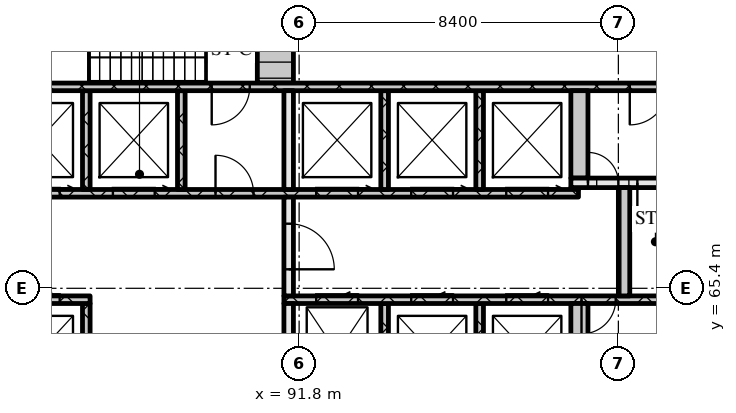
"""IFC4 building model, lengths in metres.
Left out: names, types, materials, properties, quantities, classifications, styles, units other than length and angle.
Written with IfcOpenShell. Run it as: python <this file> out.ifc"""

import sys

from ifc_helpers import new_model, si_unit, direction, frame, frame_2d, origin, place, context, subcontext, project, spatial, rectangle, extrude, element, fill, save


model = new_model("IFC4")
c1 = context("Model", 3, precision=1e-05, world=origin(), true_north=direction((0.0, 1.0)))
c2 = subcontext(c1, "Body", "Model", "MODEL_VIEW")
j1 = project(units=[si_unit("LENGTHUNIT", "METRE"), si_unit("PLANEANGLEUNIT", "RADIAN")], contexts=[c1])
p1 = place(None, origin())
s1 = spatial("IfcSite", under=j1, at=p1, CompositionType="ELEMENT")
p2 = place(p1, origin())
s2 = spatial("IfcBuilding", under=s1, at=p2, CompositionType="ELEMENT")
p3 = place(p2, origin())
s3 = spatial("IfcBuildingStorey", under=s2, at=p3, CompositionType="ELEMENT", Elevation=0.0)
p4 = place(p3, frame((86.2, 62.4, 0.0), z_axis=(0.0, 0.0, 1.0), x_axis=(0.0, 1.0, 0.0)))
e1 = element("IfcWall", 1, at=p4, inside=s3, PredefinedType="SOLIDWALL", context=c2, shape_type="SweptSolid", body=[
    extrude(rectangle(XDim=2.6, YDim=0.2, at=frame_2d((1.3, 0.0))), origin(), (0.0, 0.0, 1.0), 8.7),
])
p5 = place(p3, frame((91.525, 62.4, 0.0), z_axis=(0.0, 0.0, 1.0), x_axis=(0.0, 1.0, 0.0)))
e2 = element("IfcWall", 2, at=p5, inside=s3, PredefinedType="SOLIDWALL", context=c2, shape_type="SweptSolid", body=[
    extrude(rectangle(XDim=2.6, YDim=0.25, at=frame_2d((1.3, 0.0))), origin(), (0.0, 0.0, 1.0), 8.7),
])
for number, where, z_axis, x_axis in (
    (3, (94.05, 62.4, 0.0), (0.0, 0.0, 1.0), (0.0, 1.0, 0.0)),
    (4, (96.55, 62.4, 0.0), (0.0, 0.0, 1.0), (0.0, 1.0, 0.0)),
):
    element("IfcWall", number, at=place(p3, frame(where, z_axis=z_axis, x_axis=x_axis)), inside=s3, PredefinedType="SOLIDWALL", context=c2, shape_type="SweptSolid", body=[
        extrude(rectangle(XDim=2.6, YDim=0.2, at=frame_2d((1.3, 0.0))), origin(), (0.0, 0.0, 1.0), 8.7),
    ])
p6 = place(p3, frame((99.175, 62.4, 0.0), z_axis=(0.0, 0.0, 1.0), x_axis=(0.0, 1.0, 0.0)))
e5 = element("IfcWall", 5, at=p6, inside=s3, PredefinedType="SOLIDWALL", context=c2, shape_type="SweptSolid", body=[
    extrude(rectangle(XDim=2.6, YDim=0.45, at=frame_2d((1.3, 0.0))), origin(), (0.0, 0.0, 1.0), 8.7),
])
p7 = place(p3, frame((67.8, 65.1, 0.0), z_axis=(0.0, 0.0, 1.0), x_axis=(1.0, 0.0, 0.0)))
e6 = element("IfcWall", 6, at=p7, inside=s3, PredefinedType="SOLIDWALL", context=c2, shape_type="SweptSolid", body=[
    extrude(rectangle(XDim=18.5, YDim=0.2, at=frame_2d((9.25, 0.0))), origin(), (0.0, 0.0, 1.0), 8.7),
])
p8 = place(p7, frame((7.27, 0.0, 0.0)))
e7 = element("IfcOpeningElement", 7, at=p8, cuts=e6, PredefinedType="OPENING", context=c2, shape_type="SweptSolid", body=[
    extrude(rectangle(XDim=0.9, YDim=2.1, at=frame_2d((0.45, 1.05))), frame((0.0, 0.11, 0.0), z_axis=(0.0, -1.0, 0.0), x_axis=(1.0, 0.0, 0.0)), (0.0, 0.0, 1.0), 0.22),
])
p9 = place(p7, frame((8.85, 0.0, 0.0)))
e8 = element("IfcOpeningElement", 8, at=p9, cuts=e6, PredefinedType="OPENING", context=c2, shape_type="SweptSolid", body=[
    extrude(rectangle(XDim=1.1, YDim=2.1, at=frame_2d((0.55, 1.05))), frame((0.0, 0.11, 0.0), z_axis=(0.0, -1.0, 0.0), x_axis=(1.0, 0.0, 0.0)), (0.0, 0.0, 1.0), 0.22),
])
p10 = place(p7, frame((11.35, 0.0, 0.0)))
e9 = element("IfcOpeningElement", 9, at=p10, cuts=e6, PredefinedType="OPENING", context=c2, shape_type="SweptSolid", body=[
    extrude(rectangle(XDim=1.1, YDim=2.1, at=frame_2d((0.55, 1.05))), frame((0.0, 0.11, 0.0), z_axis=(0.0, -1.0, 0.0), x_axis=(1.0, 0.0, 0.0)), (0.0, 0.0, 1.0), 0.22),
])
p11 = place(p7, frame((13.85, 0.0, 0.0)))
e10 = element("IfcOpeningElement", 10, at=p11, cuts=e6, PredefinedType="OPENING", context=c2, shape_type="SweptSolid", body=[
    extrude(rectangle(XDim=1.1, YDim=2.1, at=frame_2d((0.55, 1.05))), frame((0.0, 0.11, 0.0), z_axis=(0.0, -1.0, 0.0), x_axis=(1.0, 0.0, 0.0)), (0.0, 0.0, 1.0), 0.22),
])
p12 = place(p7, frame((16.6, 0.0, 0.0)))
e11 = element("IfcOpeningElement", 11, at=p12, cuts=e6, PredefinedType="OPENING", context=c2, shape_type="SweptSolid", body=[
    extrude(rectangle(XDim=1.1, YDim=2.1, at=frame_2d((0.55, 1.05))), frame((0.0, 0.11, 0.0), z_axis=(0.0, -1.0, 0.0), x_axis=(1.0, 0.0, 0.0)), (0.0, 0.0, 1.0), 0.22),
])
p13 = place(p3, frame((91.4, 65.1, 0.0), z_axis=(0.0, 0.0, 1.0), x_axis=(1.0, 0.0, 0.0)))
e12 = element("IfcWall", 12, at=p13, inside=s3, PredefinedType="SOLIDWALL", context=c2, shape_type="SweptSolid", body=[
    extrude(rectangle(XDim=16.0, YDim=0.2, at=frame_2d((8.0, 0.0))), origin(), (0.0, 0.0, 1.0), 8.7),
])
p14 = place(p13, frame((0.85, 0.0, 0.0)))
e13 = element("IfcOpeningElement", 13, at=p14, cuts=e12, PredefinedType="OPENING", context=c2, shape_type="SweptSolid", body=[
    extrude(rectangle(XDim=1.1, YDim=2.1, at=frame_2d((0.55, 1.05))), frame((0.0, 0.11, 0.0), z_axis=(0.0, -1.0, 0.0), x_axis=(1.0, 0.0, 0.0)), (0.0, 0.0, 1.0), 0.22),
])
p15 = place(p13, frame((3.35, 0.0, 0.0)))
e14 = element("IfcOpeningElement", 14, at=p15, cuts=e12, PredefinedType="OPENING", context=c2, shape_type="SweptSolid", body=[
    extrude(rectangle(XDim=1.1, YDim=2.1, at=frame_2d((0.55, 1.05))), frame((0.0, 0.11, 0.0), z_axis=(0.0, -1.0, 0.0), x_axis=(1.0, 0.0, 0.0)), (0.0, 0.0, 1.0), 0.22),
])
p16 = place(p13, frame((5.85, 0.0, 0.0)))
e15 = element("IfcOpeningElement", 15, at=p16, cuts=e12, PredefinedType="OPENING", context=c2, shape_type="SweptSolid", body=[
    extrude(rectangle(XDim=1.1, YDim=2.1, at=frame_2d((0.55, 1.05))), frame((0.0, 0.11, 0.0), z_axis=(0.0, -1.0, 0.0), x_axis=(1.0, 0.0, 0.0)), (0.0, 0.0, 1.0), 0.22),
])
p17 = place(p13, frame((7.83, 0.0, 0.0)))
e16 = element("IfcOpeningElement", 16, at=p17, cuts=e12, PredefinedType="OPENING", context=c2, shape_type="SweptSolid", body=[
    extrude(rectangle(XDim=0.9, YDim=2.1, at=frame_2d((0.45, 1.05))), frame((0.0, 0.11, 0.0), z_axis=(0.0, -1.0, 0.0), x_axis=(1.0, 0.0, 0.0)), (0.0, 0.0, 1.0), 0.22),
])
p18 = place(p3, frame((91.525, 65.2, 0.0), z_axis=(0.0, 0.0, 1.0), x_axis=(0.0, 1.0, 0.0)))
e17 = element("IfcWall", 17, at=p18, inside=s3, PredefinedType="SOLIDWALL", context=c2, shape_type="SweptSolid", body=[
    extrude(rectangle(XDim=2.6, YDim=0.25, at=frame_2d((1.3, 0.0))), origin(), (0.0, 0.0, 1.0), 8.7),
])
p19 = place(p18, frame((0.7, 0.0, 0.0)))
e18 = element("IfcOpeningElement", 18, at=p19, cuts=e17, PredefinedType="OPENING", context=c2, shape_type="SweptSolid", body=[
    extrude(rectangle(XDim=1.2, YDim=2.1, at=frame_2d((0.6, 1.05))), frame((0.0, 0.135, 0.0), z_axis=(0.0, -1.0, 0.0), x_axis=(1.0, 0.0, 0.0)), (0.0, 0.0, 1.0), 0.27),
])
p20 = place(p3, frame((100.35, 65.2, 0.0), z_axis=(0.0, 0.0, 1.0), x_axis=(0.0, 1.0, 0.0)))
e19 = element("IfcWall", 19, at=p20, inside=s3, PredefinedType="SOLIDWALL", context=c2, shape_type="SweptSolid", body=[
    extrude(rectangle(XDim=2.85, YDim=0.3, at=frame_2d((1.425, 0.0))), origin(), (0.0, 0.0, 1.0), 8.7),
])
p21 = place(p3, frame((76.05, 67.9, 0.0), z_axis=(0.0, 0.0, 1.0), x_axis=(1.0, 0.0, 0.0)))
e20 = element("IfcWall", 20, at=p21, inside=s3, PredefinedType="SOLIDWALL", context=c2, shape_type="SweptSolid", body=[
    extrude(rectangle(XDim=23.1, YDim=0.2, at=frame_2d((11.55, 0.0))), origin(), (0.0, 0.0, 1.0), 8.7),
])
p22 = place(p21, frame((0.6, 0.0, 0.0)))
e21 = element("IfcOpeningElement", 21, at=p22, cuts=e20, PredefinedType="OPENING", context=c2, shape_type="SweptSolid", body=[
    extrude(rectangle(XDim=1.1, YDim=2.1, at=frame_2d((0.55, 1.05))), frame((0.0, 0.11, 0.0), z_axis=(0.0, -1.0, 0.0), x_axis=(1.0, 0.0, 0.0)), (0.0, 0.0, 1.0), 0.22),
])
p23 = place(p21, frame((3.1, 0.0, 0.0)))
e22 = element("IfcOpeningElement", 22, at=p23, cuts=e20, PredefinedType="OPENING", context=c2, shape_type="SweptSolid", body=[
    extrude(rectangle(XDim=1.1, YDim=2.1, at=frame_2d((0.55, 1.05))), frame((0.0, 0.11, 0.0), z_axis=(0.0, -1.0, 0.0), x_axis=(1.0, 0.0, 0.0)), (0.0, 0.0, 1.0), 0.22),
])
p24 = place(p21, frame((5.6, 0.0, 0.0)))
e23 = element("IfcOpeningElement", 23, at=p24, cuts=e20, PredefinedType="OPENING", context=c2, shape_type="SweptSolid", body=[
    extrude(rectangle(XDim=1.1, YDim=2.1, at=frame_2d((0.55, 1.05))), frame((0.0, 0.11, 0.0), z_axis=(0.0, -1.0, 0.0), x_axis=(1.0, 0.0, 0.0)), (0.0, 0.0, 1.0), 0.22),
])
p25 = place(p21, frame((8.35, 0.0, 0.0)))
e24 = element("IfcOpeningElement", 24, at=p25, cuts=e20, PredefinedType="OPENING", context=c2, shape_type="SweptSolid", body=[
    extrude(rectangle(XDim=1.1, YDim=2.1, at=frame_2d((0.55, 1.05))), frame((0.0, 0.11, 0.0), z_axis=(0.0, -1.0, 0.0), x_axis=(1.0, 0.0, 0.0)), (0.0, 0.0, 1.0), 0.22),
])
p26 = place(p21, frame((10.85, 0.0, 0.0)))
e25 = element("IfcOpeningElement", 25, at=p26, cuts=e20, PredefinedType="OPENING", context=c2, shape_type="SweptSolid", body=[
    extrude(rectangle(XDim=1.1, YDim=2.1, at=frame_2d((0.55, 1.05))), frame((0.0, 0.11, 0.0), z_axis=(0.0, -1.0, 0.0), x_axis=(1.0, 0.0, 0.0)), (0.0, 0.0, 1.0), 0.22),
])
p27 = place(p21, frame((13.55, 0.0, 0.0)))
e26 = element("IfcOpeningElement", 26, at=p27, cuts=e20, PredefinedType="OPENING", context=c2, shape_type="SweptSolid", body=[
    extrude(rectangle(XDim=1.0, YDim=2.1, at=frame_2d((0.5, 1.05))), frame((0.0, 0.11, 0.0), z_axis=(0.0, -1.0, 0.0), x_axis=(1.0, 0.0, 0.0)), (0.0, 0.0, 1.0), 0.22),
])
p28 = place(p21, frame((16.2, 0.0, 0.0)))
e27 = element("IfcOpeningElement", 27, at=p28, cuts=e20, PredefinedType="OPENING", context=c2, shape_type="SweptSolid", body=[
    extrude(rectangle(XDim=1.1, YDim=2.1, at=frame_2d((0.55, 1.05))), frame((0.0, 0.11, 0.0), z_axis=(0.0, -1.0, 0.0), x_axis=(1.0, 0.0, 0.0)), (0.0, 0.0, 1.0), 0.22),
])
p29 = place(p21, frame((18.7, 0.0, 0.0)))
e28 = element("IfcOpeningElement", 28, at=p29, cuts=e20, PredefinedType="OPENING", context=c2, shape_type="SweptSolid", body=[
    extrude(rectangle(XDim=1.1, YDim=2.1, at=frame_2d((0.55, 1.05))), frame((0.0, 0.11, 0.0), z_axis=(0.0, -1.0, 0.0), x_axis=(1.0, 0.0, 0.0)), (0.0, 0.0, 1.0), 0.22),
])
p30 = place(p21, frame((21.2, 0.0, 0.0)))
e29 = element("IfcOpeningElement", 29, at=p30, cuts=e20, PredefinedType="OPENING", context=c2, shape_type="SweptSolid", body=[
    extrude(rectangle(XDim=1.1, YDim=2.1, at=frame_2d((0.55, 1.05))), frame((0.0, 0.11, 0.0), z_axis=(0.0, -1.0, 0.0), x_axis=(1.0, 0.0, 0.0)), (0.0, 0.0, 1.0), 0.22),
])
for number, where, z_axis, x_axis in (
    (30, (86.2, 68.0, 0.0), (0.0, 0.0, 1.0), (0.0, 1.0, 0.0)),
    (31, (88.7, 68.0, 0.0), (0.0, 0.0, 1.0), (0.0, 1.0, 0.0)),
):
    element("IfcWall", number, at=place(p3, frame(where, z_axis=z_axis, x_axis=x_axis)), inside=s3, PredefinedType="SOLIDWALL", context=c2, shape_type="SweptSolid", body=[
        extrude(rectangle(XDim=2.6, YDim=0.2, at=frame_2d((1.3, 0.0))), origin(), (0.0, 0.0, 1.0), 8.7),
    ])
p31 = place(p3, frame((91.525, 68.0, 0.0), z_axis=(0.0, 0.0, 1.0), x_axis=(0.0, 1.0, 0.0)))
e32 = element("IfcWall", 32, at=p31, inside=s3, PredefinedType="SOLIDWALL", context=c2, shape_type="SweptSolid", body=[
    extrude(rectangle(XDim=2.6, YDim=0.25, at=frame_2d((1.3, 0.0))), origin(), (0.0, 0.0, 1.0), 8.7),
])
for number, where, z_axis, x_axis in (
    (33, (94.05, 68.0, 0.0), (0.0, 0.0, 1.0), (0.0, 1.0, 0.0)),
    (34, (96.55, 68.0, 0.0), (0.0, 0.0, 1.0), (0.0, 1.0, 0.0)),
):
    element("IfcWall", number, at=place(p3, frame(where, z_axis=z_axis, x_axis=x_axis)), inside=s3, PredefinedType="SOLIDWALL", context=c2, shape_type="SweptSolid", body=[
        extrude(rectangle(XDim=2.6, YDim=0.2, at=frame_2d((1.3, 0.0))), origin(), (0.0, 0.0, 1.0), 8.7),
    ])
p32 = place(p3, frame((98.95, 68.025, 0.0), z_axis=(0.0, 0.0, 1.0), x_axis=(1.0, 0.0, 0.0)))
e35 = element("IfcWall", 35, at=p32, inside=s3, PredefinedType="SOLIDWALL", context=c2, shape_type="SweptSolid", body=[
    extrude(rectangle(XDim=0.2, YDim=0.05, at=frame_2d((0.1, 0.0))), origin(), (0.0, 0.0, 1.0), 8.7),
])
p33 = place(p3, frame((98.95, 68.175, 0.0), z_axis=(0.0, 0.0, 1.0), x_axis=(1.0, 0.0, 0.0)))
e36 = element("IfcWall", 36, at=p33, inside=s3, PredefinedType="SOLIDWALL", context=c2, shape_type="SweptSolid", body=[
    extrude(rectangle(XDim=8.45, YDim=0.25, at=frame_2d((4.225, 0.0))), origin(), (0.0, 0.0, 1.0), 8.7),
])
p34 = place(p33, frame((0.45, 0.0, 0.0)))
e37 = element("IfcOpeningElement", 37, at=p34, cuts=e36, PredefinedType="OPENING", context=c2, shape_type="SweptSolid", body=[
    extrude(rectangle(XDim=0.8, YDim=2.1, at=frame_2d((0.4, 1.05))), frame((0.0, 0.135, 0.0), z_axis=(0.0, -1.0, 0.0), x_axis=(1.0, 0.0, 0.0)), (0.0, 0.0, 1.0), 0.27),
])
p35 = place(p33, frame((1.75, 0.0, 0.0)))
e38 = element("IfcOpeningElement", 38, at=p35, cuts=e36, PredefinedType="OPENING", context=c2, shape_type="SweptSolid", body=[
    extrude(rectangle(XDim=1.0, YDim=2.1, at=frame_2d((0.5, 1.05))), frame((0.0, 0.135, 0.0), z_axis=(0.0, -1.0, 0.0), x_axis=(1.0, 0.0, 0.0)), (0.0, 0.0, 1.0), 0.27),
])
p36 = place(p3, frame((99.175, 68.3, 0.0), z_axis=(0.0, 0.0, 1.0), x_axis=(0.0, 1.0, 0.0)))
e39 = element("IfcWall", 39, at=p36, inside=s3, PredefinedType="SOLIDWALL", context=c2, shape_type="SweptSolid", body=[
    extrude(rectangle(XDim=2.3, YDim=0.45, at=frame_2d((1.15, 0.0))), origin(), (0.0, 0.0, 1.0), 8.7),
])
p37 = place(p3, frame((67.8, 70.7, 0.0), z_axis=(0.0, 0.0, 1.0), x_axis=(1.0, 0.0, 0.0)))
e40 = element("IfcWall", 40, at=p37, inside=s3, PredefinedType="SOLIDWALL", context=c2, shape_type="SweptSolid", body=[
    extrude(rectangle(XDim=39.6, YDim=0.2, at=frame_2d((19.8, 0.0))), origin(), (0.0, 0.0, 1.0), 8.7),
])
p38 = place(p37, frame((0.65, 0.0, 0.0)))
e41 = element("IfcOpeningElement", 41, at=p38, cuts=e40, PredefinedType="OPENING", context=c2, shape_type="SweptSolid", body=[
    extrude(rectangle(XDim=1.1, YDim=2.1, at=frame_2d((0.55, 1.05))), frame((0.0, 0.11, 0.0), z_axis=(0.0, -1.0, 0.0), x_axis=(1.0, 0.0, 0.0)), (0.0, 0.0, 1.0), 0.22),
])
p39 = place(p37, frame((3.25, 0.0, 0.0)))
e42 = element("IfcOpeningElement", 42, at=p39, cuts=e40, PredefinedType="OPENING", context=c2, shape_type="SweptSolid", body=[
    extrude(rectangle(XDim=1.1, YDim=2.1, at=frame_2d((0.55, 1.05))), frame((0.0, 0.11, 0.0), z_axis=(0.0, -1.0, 0.0), x_axis=(1.0, 0.0, 0.0)), (0.0, 0.0, 1.0), 0.22),
])
p40 = place(p37, frame((5.9, 0.0, 0.0)))
e43 = element("IfcOpeningElement", 43, at=p40, cuts=e40, PredefinedType="OPENING", context=c2, shape_type="SweptSolid", body=[
    extrude(rectangle(XDim=1.0, YDim=2.1, at=frame_2d((0.5, 1.05))), frame((0.0, 0.11, 0.0), z_axis=(0.0, -1.0, 0.0), x_axis=(1.0, 0.0, 0.0)), (0.0, 0.0, 1.0), 0.22),
])
p41 = place(p37, frame((21.7, 0.0, 0.0)))
e44 = element("IfcOpeningElement", 44, at=p41, cuts=e40, PredefinedType="OPENING", context=c2, shape_type="SweptSolid", body=[
    extrude(rectangle(XDim=1.0, YDim=2.1, at=frame_2d((0.5, 1.05))), frame((0.0, 0.11, 0.0), z_axis=(0.0, -1.0, 0.0), x_axis=(1.0, 0.0, 0.0)), (0.0, 0.0, 1.0), 0.22),
])
p42 = place(p37, frame((32.7, 0.0, 0.0)))
e45 = element("IfcOpeningElement", 45, at=p42, cuts=e40, PredefinedType="OPENING", context=c2, shape_type="SweptSolid", body=[
    extrude(rectangle(XDim=1.0, YDim=2.1, at=frame_2d((0.5, 1.05))), frame((0.0, 0.11, 0.0), z_axis=(0.0, -1.0, 0.0), x_axis=(1.0, 0.0, 0.0)), (0.0, 0.0, 1.0), 0.22),
])
p43 = place(p37, frame((35.25, 0.0, 0.0)))
e46 = element("IfcOpeningElement", 46, at=p43, cuts=e40, PredefinedType="OPENING", context=c2, shape_type="SweptSolid", body=[
    extrude(rectangle(XDim=1.1, YDim=2.1, at=frame_2d((0.55, 1.05))), frame((0.0, 0.11, 0.0), z_axis=(0.0, -1.0, 0.0), x_axis=(1.0, 0.0, 0.0)), (0.0, 0.0, 1.0), 0.22),
])
p44 = place(p37, frame((37.85, 0.0, 0.0)))
e47 = element("IfcOpeningElement", 47, at=p44, cuts=e40, PredefinedType="OPENING", context=c2, shape_type="SweptSolid", body=[
    extrude(rectangle(XDim=1.1, YDim=2.1, at=frame_2d((0.55, 1.05))), frame((0.0, 0.11, 0.0), z_axis=(0.0, -1.0, 0.0), x_axis=(1.0, 0.0, 0.0)), (0.0, 0.0, 1.0), 0.22),
])
p45 = place(p3, frame((91.175, 70.8, 0.0), z_axis=(0.0, 0.0, 1.0), x_axis=(0.0, 1.0, 0.0)))
e48 = element("IfcWall", 48, at=p45, inside=s3, PredefinedType="SOLIDWALL", context=c2, shape_type="SweptSolid", body=[
    extrude(rectangle(XDim=1.2, YDim=0.95, at=frame_2d((0.6, 0.0))), origin(), (0.0, 0.0, 1.0), 8.7),
])
p46 = place(p12, origin())
e49 = element("IfcDoor", 49, at=p46, inside=s3, OperationType="SLIDING_TO_LEFT", PredefinedType="DOOR", context=c2, shape_type="SweptSolid", body=[
    extrude(rectangle(XDim=1.1, YDim=2.1, at=frame_2d((0.55, 1.05))), frame((0.0, 0.025, 0.0), z_axis=(0.0, -1.0, 0.0), x_axis=(1.0, 0.0, 0.0)), (0.0, 0.0, 1.0), 0.05),
])
fill(e11, e49)
p47 = place(p14, origin())
e50 = element("IfcDoor", 50, at=p47, inside=s3, OperationType="SLIDING_TO_LEFT", PredefinedType="DOOR", context=c2, shape_type="SweptSolid", body=[
    extrude(rectangle(XDim=1.1, YDim=2.1, at=frame_2d((0.55, 1.05))), frame((0.0, 0.025, 0.0), z_axis=(0.0, -1.0, 0.0), x_axis=(1.0, 0.0, 0.0)), (0.0, 0.0, 1.0), 0.05),
])
fill(e13, e50)
p48 = place(p15, origin())
e51 = element("IfcDoor", 51, at=p48, inside=s3, OperationType="SLIDING_TO_LEFT", PredefinedType="DOOR", context=c2, shape_type="SweptSolid", body=[
    extrude(rectangle(XDim=1.1, YDim=2.1, at=frame_2d((0.55, 1.05))), frame((0.0, 0.025, 0.0), z_axis=(0.0, -1.0, 0.0), x_axis=(1.0, 0.0, 0.0)), (0.0, 0.0, 1.0), 0.05),
])
fill(e14, e51)
p49 = place(p16, origin())
e52 = element("IfcDoor", 52, at=p49, inside=s3, OperationType="SLIDING_TO_LEFT", PredefinedType="DOOR", context=c2, shape_type="SweptSolid", body=[
    extrude(rectangle(XDim=1.1, YDim=2.1, at=frame_2d((0.55, 1.05))), frame((0.0, 0.025, 0.0), z_axis=(0.0, -1.0, 0.0), x_axis=(1.0, 0.0, 0.0)), (0.0, 0.0, 1.0), 0.05),
])
fill(e15, e52)
p50 = place(p17, origin())
e53 = element("IfcDoor", 53, at=p50, inside=s3, OperationType="SINGLE_SWING_RIGHT", PredefinedType="DOOR", context=c2, shape_type="SweptSolid", body=[
    extrude(rectangle(XDim=0.9, YDim=2.1, at=frame_2d((0.45, 1.05))), frame((0.0, 0.025, 0.0), z_axis=(0.0, -1.0, 0.0), x_axis=(1.0, 0.0, 0.0)), (0.0, 0.0, 1.0), 0.05),
])
fill(e16, e53)
p51 = place(p19, origin())
e54 = element("IfcDoor", 54, at=p51, inside=s3, OperationType="SINGLE_SWING_RIGHT", PredefinedType="DOOR", context=c2, shape_type="SweptSolid", body=[
    extrude(rectangle(XDim=1.2, YDim=2.1, at=frame_2d((0.6, 1.05))), frame((0.0, 0.025, 0.0), z_axis=(0.0, -1.0, 0.0), x_axis=(1.0, 0.0, 0.0)), (0.0, 0.0, 1.0), 0.05),
])
fill(e18, e54)
p52 = place(p25, origin())
e55 = element("IfcDoor", 55, at=p52, inside=s3, OperationType="SLIDING_TO_RIGHT", PredefinedType="DOOR", context=c2, shape_type="SweptSolid", body=[
    extrude(rectangle(XDim=1.1, YDim=2.1, at=frame_2d((0.55, 1.05))), frame((0.0, 0.025, 0.0), z_axis=(0.0, -1.0, 0.0), x_axis=(1.0, 0.0, 0.0)), (0.0, 0.0, 1.0), 0.05),
])
fill(e24, e55)
p53 = place(p26, origin())
e56 = element("IfcDoor", 56, at=p53, inside=s3, OperationType="SLIDING_TO_RIGHT", PredefinedType="DOOR", context=c2, shape_type="SweptSolid", body=[
    extrude(rectangle(XDim=1.1, YDim=2.1, at=frame_2d((0.55, 1.05))), frame((0.0, 0.025, 0.0), z_axis=(0.0, -1.0, 0.0), x_axis=(1.0, 0.0, 0.0)), (0.0, 0.0, 1.0), 0.05),
])
fill(e25, e56)
p54 = place(p27, origin())
e57 = element("IfcDoor", 57, at=p54, inside=s3, OperationType="SINGLE_SWING_LEFT", PredefinedType="DOOR", context=c2, shape_type="SweptSolid", body=[
    extrude(rectangle(XDim=1.0, YDim=2.1, at=frame_2d((0.5, 1.05))), frame((0.0, 0.025, 0.0), z_axis=(0.0, -1.0, 0.0), x_axis=(1.0, 0.0, 0.0)), (0.0, 0.0, 1.0), 0.05),
])
fill(e26, e57)
p55 = place(p28, origin())
e58 = element("IfcDoor", 58, at=p55, inside=s3, OperationType="SLIDING_TO_RIGHT", PredefinedType="DOOR", context=c2, shape_type="SweptSolid", body=[
    extrude(rectangle(XDim=1.1, YDim=2.1, at=frame_2d((0.55, 1.05))), frame((0.0, 0.025, 0.0), z_axis=(0.0, -1.0, 0.0), x_axis=(1.0, 0.0, 0.0)), (0.0, 0.0, 1.0), 0.05),
])
fill(e27, e58)
p56 = place(p29, origin())
e59 = element("IfcDoor", 59, at=p56, inside=s3, OperationType="SLIDING_TO_RIGHT", PredefinedType="DOOR", context=c2, shape_type="SweptSolid", body=[
    extrude(rectangle(XDim=1.1, YDim=2.1, at=frame_2d((0.55, 1.05))), frame((0.0, 0.025, 0.0), z_axis=(0.0, -1.0, 0.0), x_axis=(1.0, 0.0, 0.0)), (0.0, 0.0, 1.0), 0.05),
])
fill(e28, e59)
p57 = place(p30, origin())
e60 = element("IfcDoor", 60, at=p57, inside=s3, OperationType="SLIDING_TO_RIGHT", PredefinedType="DOOR", context=c2, shape_type="SweptSolid", body=[
    extrude(rectangle(XDim=1.1, YDim=2.1, at=frame_2d((0.55, 1.05))), frame((0.0, 0.025, 0.0), z_axis=(0.0, -1.0, 0.0), x_axis=(1.0, 0.0, 0.0)), (0.0, 0.0, 1.0), 0.05),
])
fill(e29, e60)
p58 = place(p34, origin())
e61 = element("IfcDoor", 61, at=p58, inside=s3, OperationType="SINGLE_SWING_LEFT", PredefinedType="DOOR", context=c2, shape_type="SweptSolid", body=[
    extrude(rectangle(XDim=0.8, YDim=2.1, at=frame_2d((0.4, 1.05))), frame((0.0, 0.025, 0.0), z_axis=(0.0, -1.0, 0.0), x_axis=(1.0, 0.0, 0.0)), (0.0, 0.0, 1.0), 0.05),
])
fill(e37, e61)
p59 = place(p35, origin())
e62 = element("IfcDoor", 62, at=p59, inside=s3, OperationType="SINGLE_SWING_RIGHT", PredefinedType="DOOR", context=c2, shape_type="SweptSolid", body=[
    extrude(rectangle(XDim=1.0, YDim=2.1, at=frame_2d((0.5, 1.05))), frame((0.0, 0.025, 0.0), z_axis=(0.0, -1.0, 0.0), x_axis=(1.0, 0.0, 0.0)), (0.0, 0.0, 1.0), 0.05),
])
fill(e38, e62)
p60 = place(p41, origin())
e63 = element("IfcDoor", 63, at=p60, inside=s3, OperationType="SINGLE_SWING_RIGHT", PredefinedType="DOOR", context=c2, shape_type="SweptSolid", body=[
    extrude(rectangle(XDim=1.0, YDim=2.1, at=frame_2d((0.5, 1.05))), frame((0.0, 0.025, 0.0), z_axis=(0.0, -1.0, 0.0), x_axis=(1.0, 0.0, 0.0)), (0.0, 0.0, 1.0), 0.05),
])
fill(e44, e63)
p61 = place(p42, origin())
e64 = element("IfcDoor", 64, at=p61, inside=s3, OperationType="SINGLE_SWING_RIGHT", PredefinedType="DOOR", context=c2, shape_type="SweptSolid", body=[
    extrude(rectangle(XDim=1.0, YDim=2.1, at=frame_2d((0.5, 1.05))), frame((0.0, 0.025, 0.0), z_axis=(0.0, -1.0, 0.0), x_axis=(1.0, 0.0, 0.0)), (0.0, 0.0, 1.0), 0.05),
])
fill(e45, e64)
save(model, sys.argv[1])
